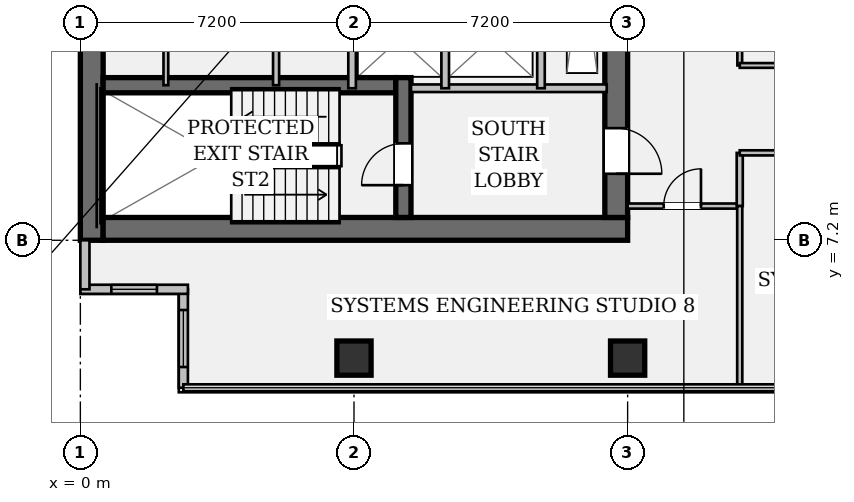
"""IFC4 building model, lengths in metres.
Left out: names, types, materials, properties, quantities, classifications, styles, units other than length and angle.
Written with IfcOpenShell. Run it as: python <this file> out.ifc"""

import sys

from ifc_helpers import new_model, si_unit, direction, frame, frame_2d, origin, origin_2d, place, context, subcontext, project, spatial, rectangle, hollow_rectangle, extrude, element, fill, save


model = new_model("IFC4")
c1 = context("Model", 3, precision=1e-05, world=origin(), true_north=direction((0.0, 1.0)))
c2 = subcontext(c1, "Body", "Model", "MODEL_VIEW")
j1 = project(units=[si_unit("LENGTHUNIT", "METRE"), si_unit("PLANEANGLEUNIT", "RADIAN")], contexts=[c1])
p1 = place(None, origin())
s1 = spatial("IfcSite", under=j1, at=p1, CompositionType="ELEMENT")
p2 = place(p1, origin())
s2 = spatial("IfcBuilding", under=s1, at=p2, CompositionType="ELEMENT")
p3 = place(p2, frame((0.0, 0.0, 144.55)))
s3 = spatial("IfcBuildingStorey", under=s2, at=p3, CompositionType="ELEMENT", Elevation=144.55)
p4 = place(p3, frame((0.3, 7.2, 0.0), z_axis=(0.0, 0.0, 1.0), x_axis=(0.0, 1.0, 0.0)))
e1 = element("IfcWall", 1, at=p4, inside=s3, PredefinedType="SHEAR", context=c2, shape_type="SweptSolid", body=[
    extrude(rectangle(XDim=28.8, YDim=0.6, at=frame_2d((14.4, 0.0))), origin(), (0.0, 0.0, 1.0), 3.58),
])
p5 = place(p3, frame((0.6, 7.5, 0.0), z_axis=(0.0, 0.0, 1.0), x_axis=(1.0, 0.0, 0.0)))
e2 = element("IfcWall", 2, at=p5, inside=s3, PredefinedType="SHEAR", context=c2, shape_type="SweptSolid", body=[
    extrude(rectangle(XDim=13.8, YDim=0.6, at=frame_2d((6.9, 0.0))), origin(), (0.0, 0.0, 1.0), 3.58),
])
p6 = place(p3, frame((14.1, 35.4, 0.0), z_axis=(0.0, 0.0, 1.0), x_axis=(0.0, -1.0, 0.0)))
e3 = element("IfcWall", 3, at=p6, inside=s3, PredefinedType="SHEAR", context=c2, shape_type="SweptSolid", body=[
    extrude(rectangle(XDim=27.6, YDim=0.6, at=frame_2d((13.8, 0.0))), origin(), (0.0, 0.0, 1.0), 3.58),
])
p7 = place(p6, frame((1.3, 0.0, 0.0)))
e4 = element("IfcOpeningElement", 4, at=p7, cuts=e3, PredefinedType="OPENING", context=c2, shape_type="SweptSolid", body=[
    extrude(rectangle(XDim=1.2, YDim=2.15, at=frame_2d((0.6, 1.075))), frame((0.0, 0.312, 0.0), z_axis=(0.0, -1.0, 0.0), x_axis=(1.0, 0.0, 0.0)), (0.0, 0.0, 1.0), 0.624),
])
p8 = place(p6, frame((25.25, 0.0, 0.0)))
e5 = element("IfcOpeningElement", 5, at=p8, cuts=e3, PredefinedType="OPENING", context=c2, shape_type="SweptSolid", body=[
    extrude(rectangle(XDim=1.2, YDim=2.15, at=frame_2d((0.6, 1.075))), frame((0.0, 0.312, 0.0), z_axis=(0.0, -1.0, 0.0), x_axis=(1.0, 0.0, 0.0)), (0.0, 0.0, 1.0), 0.624),
])
p9 = place(p6, frame((14.6, 0.0, 0.0)))
e6 = element("IfcOpeningElement", 6, at=p9, cuts=e3, PredefinedType="OPENING", context=c2, shape_type="SweptSolid", body=[
    extrude(rectangle(XDim=1.6, YDim=2.2, at=frame_2d((0.8, 1.1))), frame((0.0, 0.312, 0.0), z_axis=(0.0, -1.0, 0.0), x_axis=(1.0, 0.0, 0.0)), (0.0, 0.0, 1.0), 0.624),
])
p10 = place(p3, frame((0.6, 11.28, 0.0), z_axis=(0.0, 0.0, 1.0), x_axis=(1.0, 0.0, 0.0)))
e7 = element("IfcWall", 7, at=p10, inside=s3, PredefinedType="SHEAR", context=c2, shape_type="SweptSolid", body=[
    extrude(rectangle(XDim=7.7, YDim=0.4, at=frame_2d((3.85, 0.0))), origin(), (0.0, 0.0, 1.0), 3.58),
])
p11 = place(p3, frame((8.5, 7.8, 0.0), z_axis=(0.0, 0.0, 1.0), x_axis=(0.0, 1.0, 0.0)))
e8 = element("IfcWall", 8, at=p11, inside=s3, PredefinedType="SHEAR", context=c2, shape_type="SweptSolid", body=[
    extrude(rectangle(XDim=3.68, YDim=0.4, at=frame_2d((1.84, 0.0))), origin(), (0.0, 0.0, 1.0), 3.58),
])
p12 = place(p11, frame((0.85, 0.0, 0.0)))
e9 = element("IfcOpeningElement", 9, at=p12, cuts=e8, PredefinedType="OPENING", context=c2, shape_type="SweptSolid", body=[
    extrude(rectangle(XDim=1.1, YDim=2.15, at=frame_2d((0.55, 1.075))), frame((0.0, 0.212, 0.0), z_axis=(0.0, -1.0, 0.0), x_axis=(1.0, 0.0, 0.0)), (0.0, 0.0, 1.0), 0.424),
])
for number, where, z_axis, x_axis in (
    (10, (7.2, 4.1, 0.0), (0.0, 0.0, 1.0), (1.0, 0.0, 0.0)),
    (11, (14.4, 4.1, 0.0), (0.0, 0.0, 1.0), (1.0, 0.0, 0.0)),
):
    element("IfcColumn", number, at=place(p3, frame(where, z_axis=z_axis, x_axis=x_axis)), inside=s3, PredefinedType="COLUMN", context=c2, shape_type="SweptSolid", body=[
        extrude(hollow_rectangle(XDim=0.9, YDim=0.9, WallThickness=0.055, at=origin_2d()), origin(), (0.0, 0.0, 1.0), 3.58),
    ])
p13 = place(p3, frame((2.71, 3.32, 0.0), z_axis=(0.0, 0.0, 1.0), x_axis=(0.0, 1.0, 0.0)))
e12 = element("IfcWall", 12, at=p13, inside=s3, PredefinedType="STANDARD", context=c2, shape_type="SweptSolid", body=[
    extrude(rectangle(XDim=2.59, YDim=0.24, at=frame_2d((1.295, 0.0))), origin(), (0.0, 0.0, 1.0), 3.58),
])
p14 = place(p13, frame((0.545, 0.0, 0.95)))
e13 = element("IfcOpeningElement", 13, at=p14, cuts=e12, PredefinedType="OPENING", context=c2, shape_type="SweptSolid", body=[
    extrude(rectangle(XDim=1.5, YDim=1.8, at=frame_2d((0.75, 0.9))), frame((0.0, 0.132, 0.0), z_axis=(0.0, -1.0, 0.0), x_axis=(1.0, 0.0, 0.0)), (0.0, 0.0, 1.0), 0.264),
])
p15 = place(p3, frame((2.83, 5.91, 0.0), z_axis=(0.0, 0.0, 1.0), x_axis=(-1.0, 0.0, 0.0)))
e14 = element("IfcWall", 14, at=p15, inside=s3, PredefinedType="STANDARD", context=c2, shape_type="SweptSolid", body=[
    extrude(rectangle(XDim=2.83, YDim=0.24, at=frame_2d((1.415, 0.0))), origin(), (0.0, 0.0, 1.0), 3.58),
])
p16 = place(p15, frame((0.815, 0.0, 0.95)))
e15 = element("IfcOpeningElement", 15, at=p16, cuts=e14, PredefinedType="OPENING", context=c2, shape_type="SweptSolid", body=[
    extrude(rectangle(XDim=1.2, YDim=1.8, at=frame_2d((0.6, 0.9))), frame((0.0, 0.132, 0.0), z_axis=(0.0, -1.0, 0.0), x_axis=(1.0, 0.0, 0.0)), (0.0, 0.0, 1.0), 0.264),
])
p17 = place(p3, frame((0.12, 5.91, 0.0), z_axis=(0.0, 0.0, 1.0), x_axis=(0.0, 1.0, 0.0)))
e16 = element("IfcWall", 16, at=p17, inside=s3, PredefinedType="STANDARD", context=c2, shape_type="SweptSolid", body=[
    extrude(rectangle(XDim=1.29, YDim=0.24, at=frame_2d((0.645, 0.0))), origin(), (0.0, 0.0, 1.0), 3.58),
])
p18 = place(p3, frame((8.7, 11.2, 0.0), z_axis=(0.0, 0.0, 1.0), x_axis=(1.0, 0.0, 0.0)))
e17 = element("IfcWall", 17, at=p18, inside=s3, PredefinedType="PARTITIONING", context=c2, shape_type="SweptSolid", body=[
    extrude(rectangle(XDim=5.15, YDim=0.2, at=frame_2d((2.575, 0.0))), origin(), (0.0, 0.0, 1.0), 3.58),
])
for number, where, z_axis, x_axis in (
    (18, (7.15, 11.2, 0.0), (0.0, 0.0, 1.0), (0.0, 1.0, 0.0)),
    (19, (9.6, 11.2, 0.0), (0.0, 0.0, 1.0), (0.0, 1.0, 0.0)),
):
    element("IfcWall", number, at=place(p3, frame(where, z_axis=z_axis, x_axis=x_axis)), inside=s3, PredefinedType="PARTITIONING", context=c2, shape_type="SweptSolid", body=[
        extrude(rectangle(XDim=2.4, YDim=0.2, at=frame_2d((1.2, 0.0))), origin(), (0.0, 0.0, 1.0), 3.58),
    ])
p19 = place(p3, frame((12.12, 11.2, 0.0), z_axis=(0.0, 0.0, 1.0), x_axis=(0.0, 1.0, 0.0)))
e20 = element("IfcWall", 20, at=p19, inside=s3, PredefinedType="PARTITIONING", context=c2, shape_type="SweptSolid", body=[
    extrude(rectangle(XDim=6.6, YDim=0.2, at=frame_2d((3.3, 0.0))), origin(), (0.0, 0.0, 1.0), 3.58),
])
p20 = place(p19, frame((2.95, 0.0, 0.0)))
e21 = element("IfcOpeningElement", 21, at=p20, cuts=e20, PredefinedType="OPENING", context=c2, shape_type="SweptSolid", body=[
    extrude(rectangle(XDim=0.85, YDim=2.15, at=frame_2d((0.425, 1.075))), frame((0.0, 0.112, 0.0), z_axis=(0.0, -1.0, 0.0), x_axis=(1.0, 0.0, 0.0)), (0.0, 0.0, 1.0), 0.224),
])
p21 = place(p3, frame((5.15, 11.28, 0.0), z_axis=(0.0, 0.0, 1.0), x_axis=(0.0, 1.0, 0.0)))
e22 = element("IfcWall", 22, at=p21, inside=s3, PredefinedType="PARTITIONING", context=c2, shape_type="SweptSolid", body=[
    extrude(rectangle(XDim=4.42, YDim=0.16, at=frame_2d((2.21, 0.0))), origin(), (0.0, 0.0, 1.0), 3.58),
])
p22 = place(p3, frame((2.25, 11.28, 0.0), z_axis=(0.0, 0.0, 1.0), x_axis=(0.0, 1.0, 0.0)))
e23 = element("IfcWall", 23, at=p22, inside=s3, PredefinedType="PARTITIONING", context=c2, shape_type="SweptSolid", body=[
    extrude(rectangle(XDim=4.42, YDim=0.125, at=frame_2d((2.21, 0.0))), origin(), (0.0, 0.0, 1.0), 3.58),
])
p23 = place(p22, frame((1.65, 0.0, 0.0)))
e24 = element("IfcOpeningElement", 24, at=p23, cuts=e23, PredefinedType="OPENING", context=c2, shape_type="SweptSolid", body=[
    extrude(rectangle(XDim=0.85, YDim=2.15, at=frame_2d((0.425, 1.075))), frame((0.0, 0.074, 0.0), z_axis=(0.0, -1.0, 0.0), x_axis=(1.0, 0.0, 0.0)), (0.0, 0.0, 1.0), 0.149),
])
p24 = place(p3, frame((14.4, 8.1, 0.0), z_axis=(0.0, 0.0, 1.0), x_axis=(1.0, 0.0, 0.0)))
e25 = element("IfcWall", 25, at=p24, inside=s3, PredefinedType="PARTITIONING", context=c2, shape_type="SweptSolid", body=[
    extrude(rectangle(XDim=2.95, YDim=0.135, at=frame_2d((1.475, 0.0))), origin(), (0.0, 0.0, 1.0), 3.148),
])
p25 = place(p24, frame((0.95, 0.0, 0.0)))
e26 = element("IfcOpeningElement", 26, at=p25, cuts=e25, PredefinedType="OPENING", context=c2, shape_type="SweptSolid", body=[
    extrude(rectangle(XDim=0.98, YDim=2.15, at=frame_2d((0.49, 1.075))), frame((0.0, 0.08, 0.0), z_axis=(0.0, -1.0, 0.0), x_axis=(1.0, 0.0, 0.0)), (0.0, 0.0, 1.0), 0.159),
])
p26 = place(p3, frame((17.35, 8.1, 0.0), z_axis=(0.0, 0.0, 1.0), x_axis=(0.0, 1.0, 0.0)))
e27 = element("IfcWall", 27, at=p26, inside=s3, PredefinedType="PARTITIONING", context=c2, shape_type="SweptSolid", body=[
    extrude(rectangle(XDim=1.4, YDim=0.16, at=frame_2d((0.7, 0.0))), origin(), (0.0, 0.0, 1.0), 3.58),
])
p27 = place(p3, frame((17.35, 9.5, 0.0), z_axis=(0.0, 0.0, 1.0), x_axis=(1.0, 0.0, 0.0)))
e28 = element("IfcWall", 28, at=p27, inside=s3, PredefinedType="PARTITIONING", context=c2, shape_type="SweptSolid", body=[
    extrude(rectangle(XDim=15.75, YDim=0.135, at=frame_2d((7.875, 0.0))), origin(), (0.0, 0.0, 1.0), 2.869),
])
p28 = place(p27, frame((3.73, 0.0, 0.0)))
e29 = element("IfcOpeningElement", 29, at=p28, cuts=e28, PredefinedType="OPENING", context=c2, shape_type="SweptSolid", body=[
    extrude(rectangle(XDim=0.98, YDim=2.15, at=frame_2d((0.49, 1.075))), frame((0.0, 0.08, 0.0), z_axis=(0.0, -1.0, 0.0), x_axis=(1.0, 0.0, 0.0)), (0.0, 0.0, 1.0), 0.159),
])
p29 = place(p27, frame((11.6, 0.0, 0.0)))
e30 = element("IfcOpeningElement", 30, at=p29, cuts=e28, PredefinedType="OPENING", context=c2, shape_type="SweptSolid", body=[
    extrude(rectangle(XDim=0.98, YDim=2.15, at=frame_2d((0.49, 1.075))), frame((0.0, 0.08, 0.0), z_axis=(0.0, -1.0, 0.0), x_axis=(1.0, 0.0, 0.0)), (0.0, 0.0, 1.0), 0.159),
])
p30 = place(p3, frame((17.35, 11.8, 0.0), z_axis=(0.0, 0.0, 1.0), x_axis=(0.0, 1.0, 0.0)))
e31 = element("IfcWall", 31, at=p30, inside=s3, PredefinedType="PARTITIONING", context=c2, shape_type="SweptSolid", body=[
    extrude(rectangle(XDim=6.55, YDim=0.125, at=frame_2d((3.275, 0.0))), origin(), (0.0, 0.0, 1.0), 2.869),
])
p31 = place(p3, frame((17.35, 11.8, 0.0), z_axis=(0.0, 0.0, 1.0), x_axis=(1.0, 0.0, 0.0)))
e32 = element("IfcWall", 32, at=p31, inside=s3, PredefinedType="PARTITIONING", context=c2, shape_type="SweptSolid", body=[
    extrude(rectangle(XDim=13.4, YDim=0.125, at=frame_2d((6.7, 0.0))), origin(), (0.0, 0.0, 1.0), 2.869),
])
p32 = place(p3, frame((17.35, 3.32, 0.0), z_axis=(0.0, 0.0, 1.0), x_axis=(0.0, 1.0, 0.0)))
e33 = element("IfcWall", 33, at=p32, inside=s3, PredefinedType="PARTITIONING", context=c2, shape_type="SweptSolid", body=[
    extrude(rectangle(XDim=4.78, YDim=0.135, at=frame_2d((2.39, 0.0))), origin(), (0.0, 0.0, 1.0), 2.869),
])
p33 = place(p14, origin())
e34 = element("IfcWindow", 34, at=p33, inside=s3, PartitioningType="SINGLE_PANEL", PredefinedType="WINDOW", context=c2, shape_type="SweptSolid", body=[
    extrude(rectangle(XDim=1.5, YDim=1.8, at=frame_2d((0.75, 0.9))), frame((0.0, 0.03, 0.0), z_axis=(0.0, -1.0, 0.0), x_axis=(1.0, 0.0, 0.0)), (0.0, 0.0, 1.0), 0.06),
])
fill(e13, e34)
p34 = place(p16, origin())
e35 = element("IfcWindow", 35, at=p34, inside=s3, PartitioningType="SINGLE_PANEL", PredefinedType="WINDOW", context=c2, shape_type="SweptSolid", body=[
    extrude(rectangle(XDim=1.2, YDim=1.8, at=frame_2d((0.6, 0.9))), frame((0.0, 0.03, 0.0), z_axis=(0.0, -1.0, 0.0), x_axis=(1.0, 0.0, 0.0)), (0.0, 0.0, 1.0), 0.06),
])
fill(e15, e35)
p35 = place(p12, origin())
e36 = element("IfcDoor", 36, at=p35, inside=s3, OperationType="SINGLE_SWING_LEFT", PredefinedType="DOOR", context=c2, shape_type="SweptSolid", body=[
    extrude(rectangle(XDim=1.1, YDim=2.15, at=frame_2d((0.55, 1.075))), frame((0.0, 0.025, 0.0), z_axis=(0.0, -1.0, 0.0), x_axis=(1.0, 0.0, 0.0)), (0.0, 0.0, 1.0), 0.05),
])
fill(e9, e36)
p36 = place(p8, origin())
e37 = element("IfcDoor", 37, at=p36, inside=s3, OperationType="SINGLE_SWING_RIGHT", PredefinedType="DOOR", context=c2, shape_type="SweptSolid", body=[
    extrude(rectangle(XDim=1.2, YDim=2.15, at=frame_2d((0.6, 1.075))), frame((0.0, 0.025, 0.0), z_axis=(0.0, -1.0, 0.0), x_axis=(1.0, 0.0, 0.0)), (0.0, 0.0, 1.0), 0.05),
])
fill(e5, e37)
p37 = place(p25, origin())
e38 = element("IfcDoor", 38, at=p37, inside=s3, OperationType="SINGLE_SWING_RIGHT", PredefinedType="DOOR", context=c2, shape_type="SweptSolid", body=[
    extrude(rectangle(XDim=0.98, YDim=2.15, at=frame_2d((0.49, 1.075))), frame((0.0, 0.025, 0.0), z_axis=(0.0, -1.0, 0.0), x_axis=(1.0, 0.0, 0.0)), (0.0, 0.0, 1.0), 0.05),
])
fill(e26, e38)
save(model, sys.argv[1])
